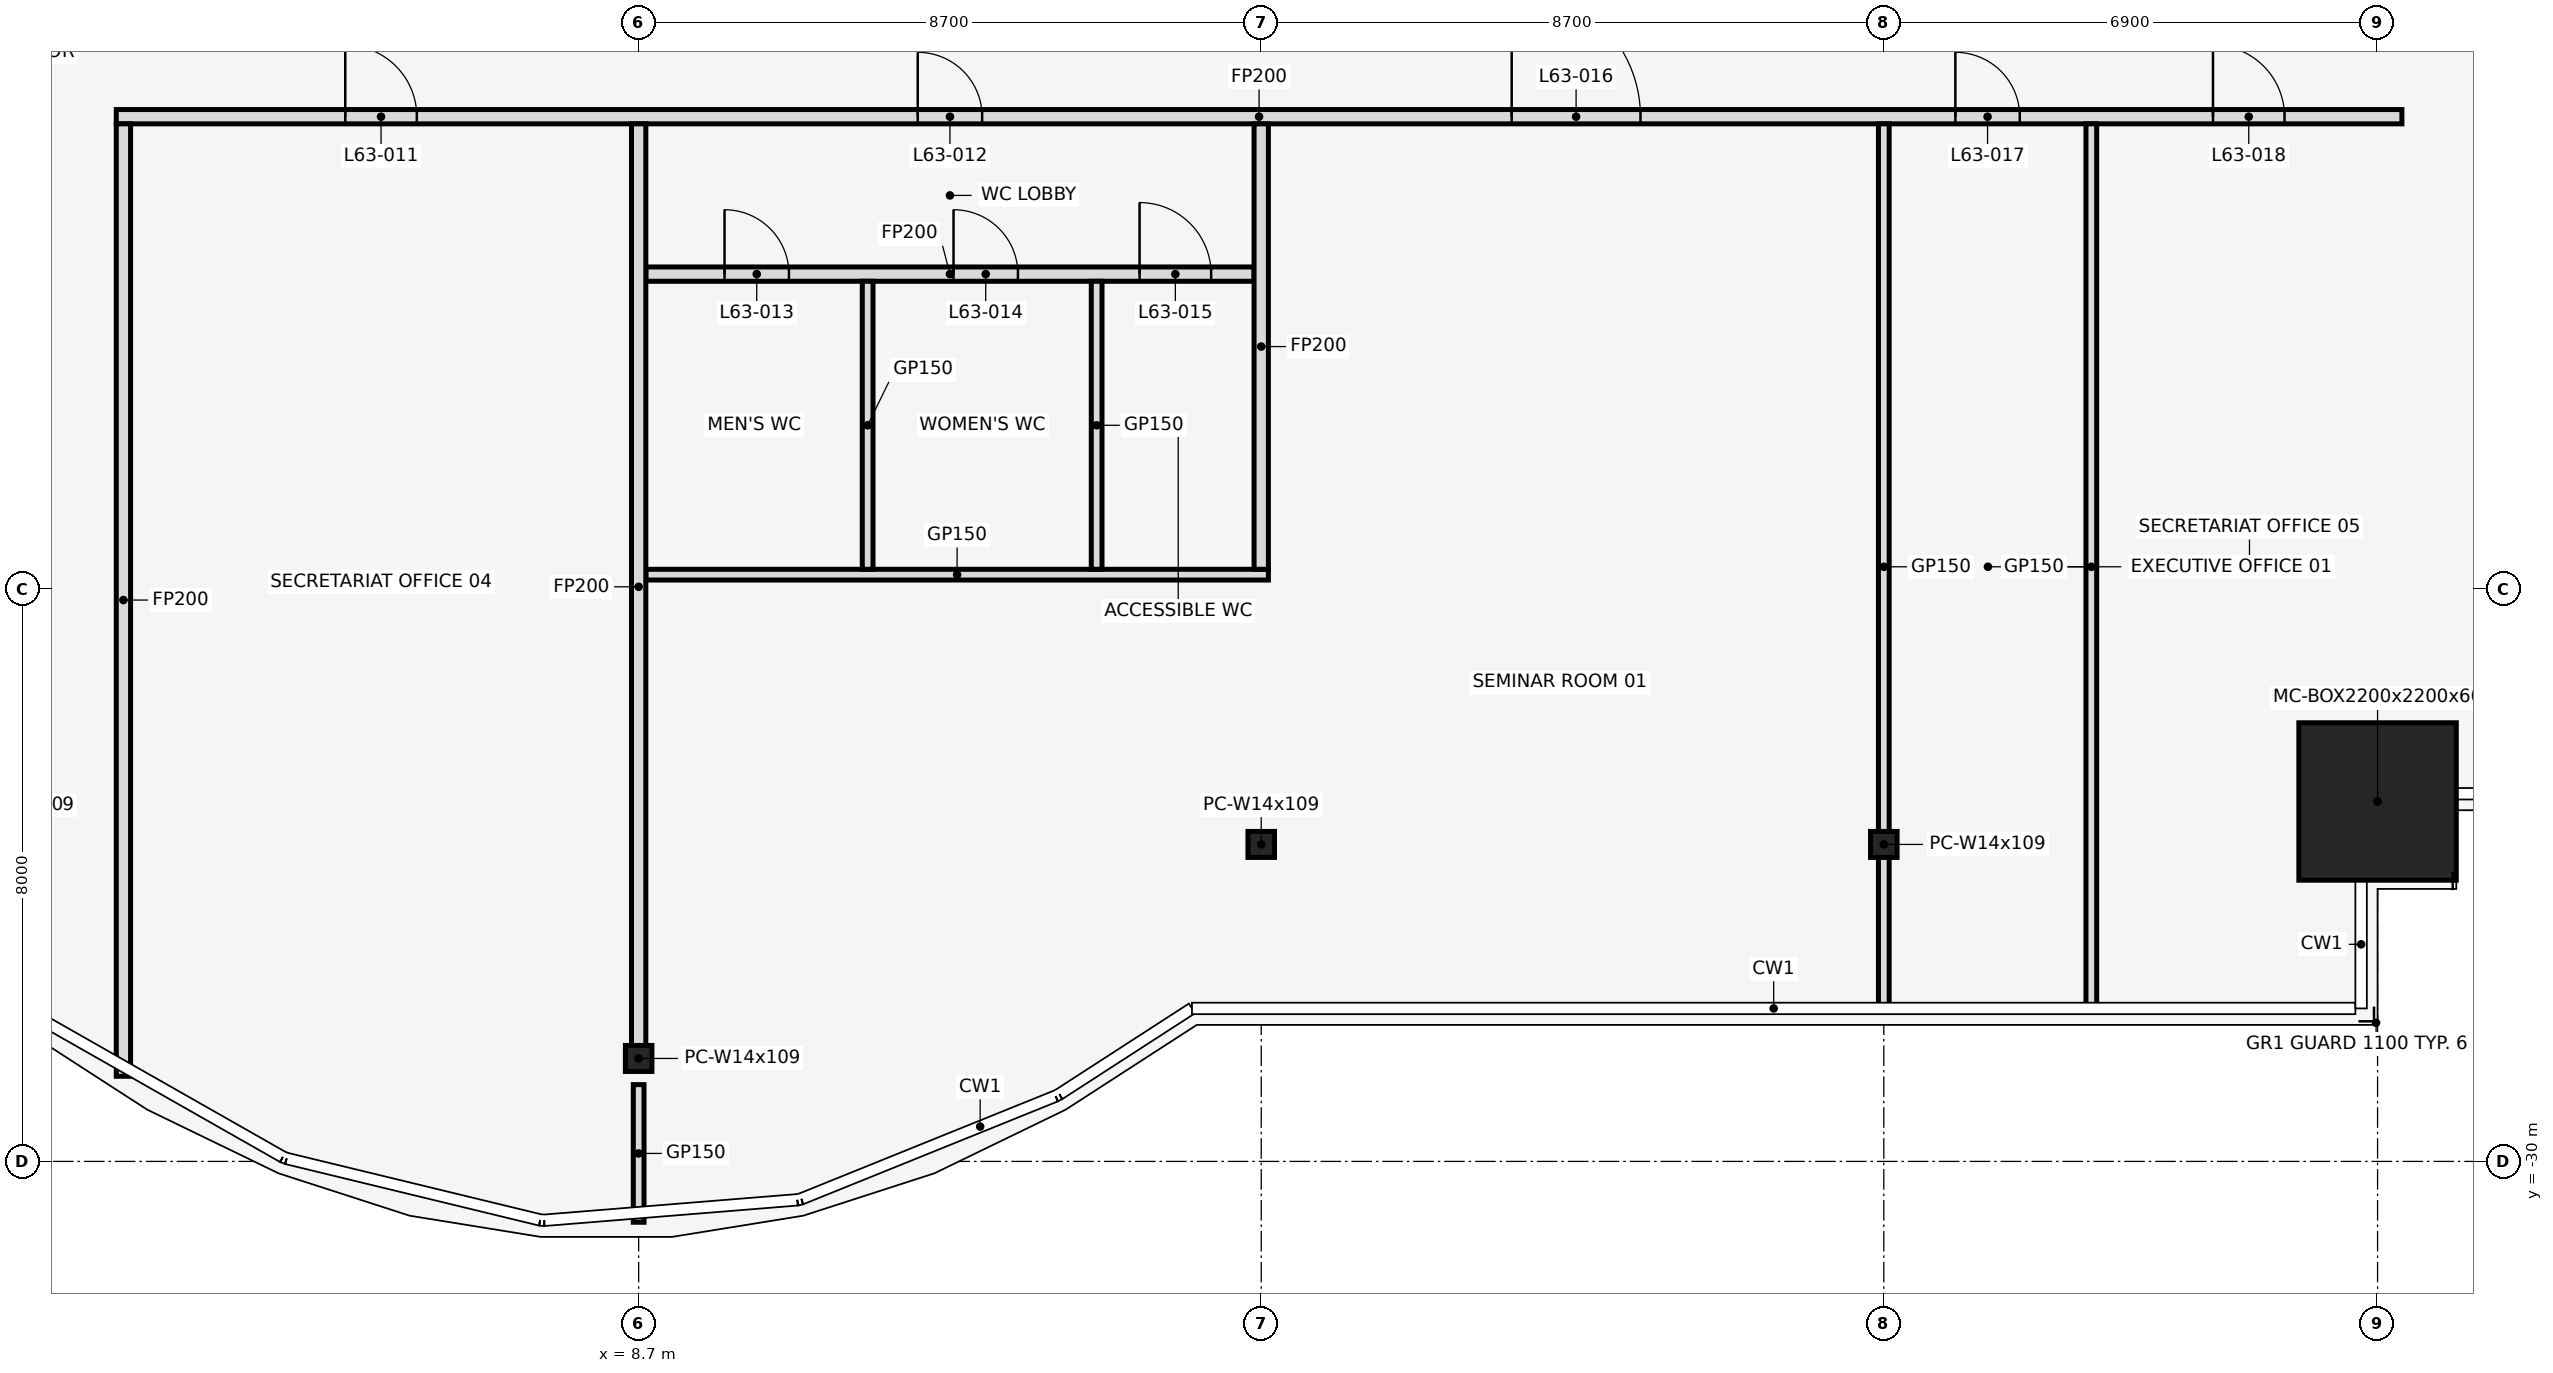
"""IFC4 building model, lengths in metres.
Left out: names, types, materials, properties, quantities, classifications, styles, units other than length and angle.
Written with IfcOpenShell. Run it as: python <this file> out.ifc"""

import sys

from ifc_helpers import new_model, si_unit, direction, frame, frame_2d, origin, origin_2d, place, context, subcontext, project, spatial, rectangle, hollow_rectangle, i_section, extrude, element, fill, save


model = new_model("IFC4")
c1 = context("Model", 3, precision=1e-05, world=origin(), true_north=direction((0.0, 1.0)))
c2 = subcontext(c1, "Body", "Model", "MODEL_VIEW")
j1 = project(units=[si_unit("LENGTHUNIT", "METRE"), si_unit("PLANEANGLEUNIT", "RADIAN")], contexts=[c1])
p1 = place(None, origin())
s1 = spatial("IfcSite", under=j1, at=p1, CompositionType="ELEMENT")
p2 = place(p1, origin())
s2 = spatial("IfcBuilding", under=s1, at=p2, CompositionType="ELEMENT")
p3 = place(p2, frame((0.0, 0.0, 279.2)))
s3 = spatial("IfcBuildingStorey", under=s2, at=p3, CompositionType="ELEMENT", Elevation=279.2)
for number, where, z_axis, x_axis in (
    (1, (8.7, -28.561, 0.0), (0.0, 0.0, 1.0), (1.0, 0.0, 0.0)),
    (2, (17.4, -25.57, 0.0), (0.0, 0.0, 1.0), (1.0, 0.0, 0.0)),
    (3, (26.1, -25.57, 0.0), (0.0, 0.0, 1.0), (1.0, 0.0, 0.0)),
):
    element("IfcColumn", number, at=place(p3, frame(where, z_axis=z_axis, x_axis=x_axis)), inside=s3, PredefinedType="COLUMN", context=c2, shape_type="SweptSolid", body=[
        extrude(i_section(OverallWidth=0.371, OverallDepth=0.363, WebThickness=0.013, FlangeThickness=0.022, at=origin_2d()), origin(), (0.0, 0.0, 1.0), 4.2),
    ])
p4 = place(p3, frame((33.0, -24.97, 0.0), z_axis=(0.0, 0.0, 1.0), x_axis=(1.0, 0.0, 0.0)))
e4 = element("IfcColumn", 4, at=p4, inside=s3, PredefinedType="COLUMN", context=c2, shape_type="SweptSolid", body=[
    extrude(hollow_rectangle(XDim=2.2, YDim=2.2, WallThickness=0.06, at=origin_2d()), origin(), (0.0, 0.0, 1.0), 4.2),
])
p5 = place(p3, frame((8.8, -21.8, 0.0), z_axis=(0.0, 0.0, 1.0), x_axis=(1.0, 0.0, 0.0)))
e5 = element("IfcWall", 5, at=p5, inside=s3, PredefinedType="PARTITIONING", context=c2, shape_type="SweptSolid", body=[
    extrude(rectangle(XDim=8.7, YDim=0.15, at=frame_2d((4.35, 0.0))), origin(), (0.0, 0.0, 1.0), 3.04),
])
p6 = place(p3, frame((8.8, -17.6, 0.0), z_axis=(0.0, 0.0, 1.0), x_axis=(1.0, 0.0, 0.0)))
e6 = element("IfcWall", 6, at=p6, inside=s3, PredefinedType="PARTITIONING", context=c2, shape_type="SweptSolid", body=[
    extrude(rectangle(XDim=8.5, YDim=0.2, at=frame_2d((4.25, 0.0))), origin(), (0.0, 0.0, 1.0), 3.04),
])
p7 = place(p6, frame((1.1, 0.0, 0.0)))
e7 = element("IfcOpeningElement", 7, at=p7, cuts=e6, PredefinedType="OPENING", context=c2, shape_type="SweptSolid", body=[
    extrude(rectangle(XDim=0.9, YDim=2.1, at=frame_2d((0.45, 1.05))), frame((0.0, 0.112, 0.0), z_axis=(0.0, -1.0, 0.0), x_axis=(1.0, 0.0, 0.0)), (0.0, 0.0, 1.0), 0.224),
])
p8 = place(p6, frame((4.3, 0.0, 0.0)))
e8 = element("IfcOpeningElement", 8, at=p8, cuts=e6, PredefinedType="OPENING", context=c2, shape_type="SweptSolid", body=[
    extrude(rectangle(XDim=0.9, YDim=2.1, at=frame_2d((0.45, 1.05))), frame((0.0, 0.112, 0.0), z_axis=(0.0, -1.0, 0.0), x_axis=(1.0, 0.0, 0.0)), (0.0, 0.0, 1.0), 0.224),
])
p9 = place(p6, frame((6.9, 0.0, 0.0)))
e9 = element("IfcOpeningElement", 9, at=p9, cuts=e6, PredefinedType="OPENING", context=c2, shape_type="SweptSolid", body=[
    extrude(rectangle(XDim=1.0, YDim=2.1, at=frame_2d((0.5, 1.05))), frame((0.0, 0.112, 0.0), z_axis=(0.0, -1.0, 0.0), x_axis=(1.0, 0.0, 0.0)), (0.0, 0.0, 1.0), 0.224),
])
p10 = place(p3, frame((1.4, -15.4, 0.0), z_axis=(0.0, 0.0, 1.0), x_axis=(1.0, 0.0, 0.0)))
e10 = element("IfcWall", 10, at=p10, inside=s3, PredefinedType="PARTITIONING", context=c2, shape_type="SweptSolid", body=[
    extrude(rectangle(XDim=31.94, YDim=0.2, at=frame_2d((15.97, 0.0))), origin(), (0.0, 0.0, 1.0), 3.04),
])
p11 = place(p10, frame((3.2, 0.0, 0.0)))
e11 = element("IfcOpeningElement", 11, at=p11, cuts=e10, PredefinedType="OPENING", context=c2, shape_type="SweptSolid", body=[
    extrude(rectangle(XDim=1.0, YDim=2.1, at=frame_2d((0.5, 1.05))), frame((0.0, 0.112, 0.0), z_axis=(0.0, -1.0, 0.0), x_axis=(1.0, 0.0, 0.0)), (0.0, 0.0, 1.0), 0.224),
])
p12 = place(p10, frame((11.2, 0.0, 0.0)))
e12 = element("IfcOpeningElement", 12, at=p12, cuts=e10, PredefinedType="OPENING", context=c2, shape_type="SweptSolid", body=[
    extrude(rectangle(XDim=0.9, YDim=2.1, at=frame_2d((0.45, 1.05))), frame((0.0, 0.112, 0.0), z_axis=(0.0, -1.0, 0.0), x_axis=(1.0, 0.0, 0.0)), (0.0, 0.0, 1.0), 0.224),
])
p13 = place(p10, frame((19.5, 0.0, 0.0)))
e13 = element("IfcOpeningElement", 13, at=p13, cuts=e10, PredefinedType="OPENING", context=c2, shape_type="SweptSolid", body=[
    extrude(rectangle(XDim=1.8, YDim=2.1, at=frame_2d((0.9, 1.05))), frame((0.0, 0.112, 0.0), z_axis=(0.0, -1.0, 0.0), x_axis=(1.0, 0.0, 0.0)), (0.0, 0.0, 1.0), 0.224),
])
p14 = place(p10, frame((25.7, 0.0, 0.0)))
e14 = element("IfcOpeningElement", 14, at=p14, cuts=e10, PredefinedType="OPENING", context=c2, shape_type="SweptSolid", body=[
    extrude(rectangle(XDim=0.9, YDim=2.1, at=frame_2d((0.45, 1.05))), frame((0.0, 0.112, 0.0), z_axis=(0.0, -1.0, 0.0), x_axis=(1.0, 0.0, 0.0)), (0.0, 0.0, 1.0), 0.224),
])
p15 = place(p10, frame((29.3, 0.0, 0.0)))
e15 = element("IfcOpeningElement", 15, at=p15, cuts=e10, PredefinedType="OPENING", context=c2, shape_type="SweptSolid", body=[
    extrude(rectangle(XDim=1.0, YDim=2.1, at=frame_2d((0.5, 1.05))), frame((0.0, 0.112, 0.0), z_axis=(0.0, -1.0, 0.0), x_axis=(1.0, 0.0, 0.0)), (0.0, 0.0, 1.0), 0.224),
])
p16 = place(p3, frame((1.5, -28.81, 0.0), z_axis=(0.0, 0.0, 1.0), x_axis=(0.0, 1.0, 0.0)))
e16 = element("IfcWall", 16, at=p16, inside=s3, PredefinedType="PARTITIONING", context=c2, shape_type="SweptSolid", body=[
    extrude(rectangle(XDim=13.31, YDim=0.2, at=frame_2d((6.655, 0.0))), origin(), (0.0, 0.0, 1.0), 3.04),
])
p17 = place(p3, frame((8.7, -30.85, 0.0), z_axis=(0.0, 0.0, 1.0), x_axis=(0.0, 1.0, 0.0)))
e17 = element("IfcWall", 17, at=p17, inside=s3, PredefinedType="PARTITIONING", context=c2, shape_type="SweptSolid", body=[
    extrude(rectangle(XDim=1.923, YDim=0.15, at=frame_2d((0.961, 0.0))), origin(), (0.0, 0.0, 1.0), 3.04),
])
p18 = place(p3, frame((8.7, -28.439, 0.0), z_axis=(0.0, 0.0, 1.0), x_axis=(0.0, 1.0, 0.0)))
e18 = element("IfcWall", 18, at=p18, inside=s3, PredefinedType="PARTITIONING", context=c2, shape_type="SweptSolid", body=[
    extrude(rectangle(XDim=12.939, YDim=0.2, at=frame_2d((6.47, 0.0))), origin(), (0.0, 0.0, 1.0), 3.04),
])
for number, where, z_axis, x_axis in (
    (19, (11.9, -21.725, 0.0), (0.0, 0.0, 1.0), (0.0, 1.0, 0.0)),
    (20, (15.1, -21.725, 0.0), (0.0, 0.0, 1.0), (0.0, 1.0, 0.0)),
):
    element("IfcWall", number, at=place(p3, frame(where, z_axis=z_axis, x_axis=x_axis)), inside=s3, PredefinedType="PARTITIONING", context=c2, shape_type="SweptSolid", body=[
        extrude(rectangle(XDim=4.025, YDim=0.15, at=frame_2d((2.013, 0.0))), origin(), (0.0, 0.0, 1.0), 3.04),
    ])
p19 = place(p3, frame((17.4, -21.725, 0.0), z_axis=(0.0, 0.0, 1.0), x_axis=(0.0, 1.0, 0.0)))
e21 = element("IfcWall", 21, at=p19, inside=s3, PredefinedType="PARTITIONING", context=c2, shape_type="SweptSolid", body=[
    extrude(rectangle(XDim=6.225, YDim=0.2, at=frame_2d((3.113, 0.0))), origin(), (0.0, 0.0, 1.0), 3.04),
])
for number, where, z_axis, x_axis in (
    (22, (26.1, -27.88, 0.0), (0.0, 0.0, 1.0), (0.0, 1.0, 0.0)),
    (23, (29.0, -27.88, 0.0), (0.0, 0.0, 1.0), (0.0, 1.0, 0.0)),
):
    element("IfcWall", number, at=place(p3, frame(where, z_axis=z_axis, x_axis=x_axis)), inside=s3, PredefinedType="PARTITIONING", context=c2, shape_type="SweptSolid", body=[
        extrude(rectangle(XDim=12.38, YDim=0.15, at=frame_2d((6.19, 0.0))), origin(), (0.0, 0.0, 1.0), 3.04),
    ])
p20 = place(p11, frame((1.0, 0.0, 0.0), z_axis=(0.0, 0.0, 1.0), x_axis=(-1.0, 0.0, 0.0)))
e24 = element("IfcDoor", 24, at=p20, inside=s3, OperationType="SINGLE_SWING_RIGHT", PredefinedType="DOOR", context=c2, shape_type="SweptSolid", body=[
    extrude(rectangle(XDim=1.0, YDim=2.1, at=frame_2d((0.5, 1.05))), frame((0.0, 0.025, 0.0), z_axis=(0.0, -1.0, 0.0), x_axis=(1.0, 0.0, 0.0)), (0.0, 0.0, 1.0), 0.05),
])
fill(e11, e24)
p21 = place(p12, frame((0.9, 0.0, 0.0), z_axis=(0.0, 0.0, 1.0), x_axis=(-1.0, 0.0, 0.0)))
e25 = element("IfcDoor", 25, at=p21, inside=s3, OperationType="SINGLE_SWING_RIGHT", PredefinedType="DOOR", context=c2, shape_type="SweptSolid", body=[
    extrude(rectangle(XDim=0.9, YDim=2.1, at=frame_2d((0.45, 1.05))), frame((0.0, 0.025, 0.0), z_axis=(0.0, -1.0, 0.0), x_axis=(1.0, 0.0, 0.0)), (0.0, 0.0, 1.0), 0.05),
])
fill(e12, e25)
p22 = place(p7, frame((0.9, 0.0, 0.0), z_axis=(0.0, 0.0, 1.0), x_axis=(-1.0, 0.0, 0.0)))
e26 = element("IfcDoor", 26, at=p22, inside=s3, OperationType="SINGLE_SWING_LEFT", PredefinedType="DOOR", context=c2, shape_type="SweptSolid", body=[
    extrude(rectangle(XDim=0.9, YDim=2.1, at=frame_2d((0.45, 1.05))), frame((0.0, 0.025, 0.0), z_axis=(0.0, -1.0, 0.0), x_axis=(1.0, 0.0, 0.0)), (0.0, 0.0, 1.0), 0.05),
])
fill(e7, e26)
p23 = place(p8, frame((0.9, 0.0, 0.0), z_axis=(0.0, 0.0, 1.0), x_axis=(-1.0, 0.0, 0.0)))
e27 = element("IfcDoor", 27, at=p23, inside=s3, OperationType="SINGLE_SWING_RIGHT", PredefinedType="DOOR", context=c2, shape_type="SweptSolid", body=[
    extrude(rectangle(XDim=0.9, YDim=2.1, at=frame_2d((0.45, 1.05))), frame((0.0, 0.025, 0.0), z_axis=(0.0, -1.0, 0.0), x_axis=(1.0, 0.0, 0.0)), (0.0, 0.0, 1.0), 0.05),
])
fill(e8, e27)
p24 = place(p9, frame((1.0, 0.0, 0.0), z_axis=(0.0, 0.0, 1.0), x_axis=(-1.0, 0.0, 0.0)))
e28 = element("IfcDoor", 28, at=p24, inside=s3, OperationType="SINGLE_SWING_RIGHT", PredefinedType="DOOR", context=c2, shape_type="SweptSolid", body=[
    extrude(rectangle(XDim=1.0, YDim=2.1, at=frame_2d((0.5, 1.05))), frame((0.0, 0.025, 0.0), z_axis=(0.0, -1.0, 0.0), x_axis=(1.0, 0.0, 0.0)), (0.0, 0.0, 1.0), 0.05),
])
fill(e9, e28)
p25 = place(p13, origin())
e29 = element("IfcDoor", 29, at=p25, inside=s3, OperationType="SINGLE_SWING_LEFT", PredefinedType="DOOR", context=c2, shape_type="SweptSolid", body=[
    extrude(rectangle(XDim=1.8, YDim=2.1, at=frame_2d((0.9, 1.05))), frame((0.0, 0.025, 0.0), z_axis=(0.0, -1.0, 0.0), x_axis=(1.0, 0.0, 0.0)), (0.0, 0.0, 1.0), 0.05),
])
fill(e13, e29)
p26 = place(p14, frame((0.9, 0.0, 0.0), z_axis=(0.0, 0.0, 1.0), x_axis=(-1.0, 0.0, 0.0)))
e30 = element("IfcDoor", 30, at=p26, inside=s3, OperationType="SINGLE_SWING_RIGHT", PredefinedType="DOOR", context=c2, shape_type="SweptSolid", body=[
    extrude(rectangle(XDim=0.9, YDim=2.1, at=frame_2d((0.45, 1.05))), frame((0.0, 0.025, 0.0), z_axis=(0.0, -1.0, 0.0), x_axis=(1.0, 0.0, 0.0)), (0.0, 0.0, 1.0), 0.05),
])
fill(e14, e30)
p27 = place(p15, frame((1.0, 0.0, 0.0), z_axis=(0.0, 0.0, 1.0), x_axis=(-1.0, 0.0, 0.0)))
e31 = element("IfcDoor", 31, at=p27, inside=s3, OperationType="SINGLE_SWING_RIGHT", PredefinedType="DOOR", context=c2, shape_type="SweptSolid", body=[
    extrude(rectangle(XDim=1.0, YDim=2.1, at=frame_2d((0.5, 1.05))), frame((0.0, 0.025, 0.0), z_axis=(0.0, -1.0, 0.0), x_axis=(1.0, 0.0, 0.0)), (0.0, 0.0, 1.0), 0.05),
])
fill(e15, e31)
save(model, sys.argv[1])
